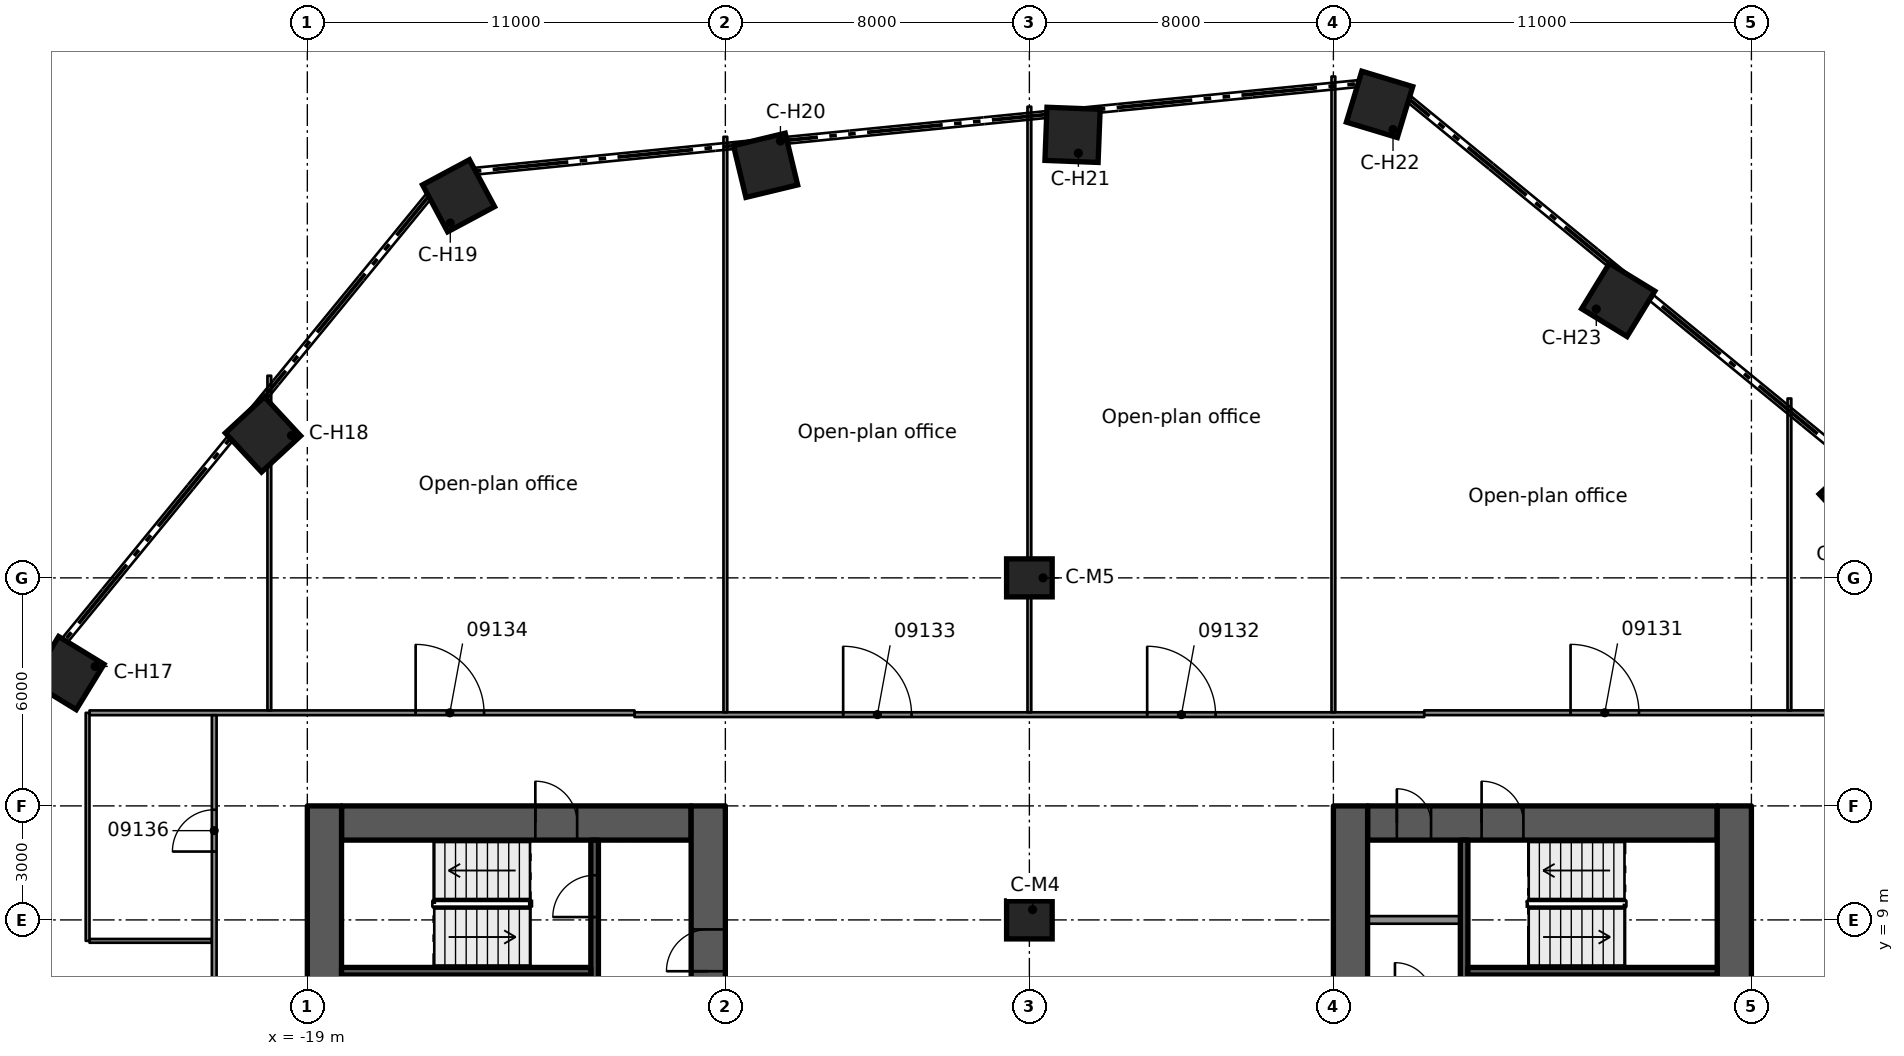
"""IFC4 building model, lengths in metres.
Left out: names, types, materials, properties, quantities, classifications, styles, units other than length and angle.
Written with IfcOpenShell. Run it as: python <this file> out.ifc"""

import sys

from ifc_helpers import new_model, si_unit, direction, frame, frame_2d, origin, origin_2d, place, context, subcontext, project, spatial, rectangle, extrude, element, fill, save


model = new_model("IFC4")
c1 = context("Model", 3, precision=1e-05, world=origin(), true_north=direction((0.0, 1.0)))
c2 = subcontext(c1, "Body", "Model", "MODEL_VIEW")
j1 = project(units=[si_unit("LENGTHUNIT", "METRE"), si_unit("PLANEANGLEUNIT", "RADIAN")], contexts=[c1])
p1 = place(None, origin())
s1 = spatial("IfcSite", under=j1, at=p1, CompositionType="ELEMENT")
p2 = place(p1, origin())
s2 = spatial("IfcBuilding", under=s1, at=p2, CompositionType="ELEMENT")
p3 = place(p2, frame((0.0, 0.0, 40.8)))
s3 = spatial("IfcBuildingStorey", under=s2, at=p3, CompositionType="ELEMENT", Elevation=40.8)
p4 = place(p3, frame((-18.1, 11.55, 0.0), z_axis=(0.0, 0.0, 1.0), x_axis=(1.0, 0.0, 0.0)))
e1 = element("IfcWall", 1, at=p4, inside=s3, PredefinedType="SHEAR", context=c2, shape_type="SweptSolid", body=[
    extrude(rectangle(XDim=9.2, YDim=0.9, at=frame_2d((4.6, 0.0))), origin(), (0.0, 0.0, 1.0), 3.5),
])
p5 = place(p4, frame((5.1, 0.0, 0.0)))
e2 = element("IfcOpeningElement", 2, at=p5, cuts=e1, PredefinedType="OPENING", context=c2, shape_type="SweptSolid", body=[
    extrude(rectangle(XDim=1.1, YDim=2.1, at=frame_2d((0.55, 1.05))), frame((0.0, 0.46, 0.0), z_axis=(0.0, -1.0, 0.0), x_axis=(1.0, 0.0, 0.0)), (0.0, 0.0, 1.0), 0.92),
])
p6 = place(p3, frame((-18.55, -12.0, 0.0), z_axis=(0.0, 0.0, 1.0), x_axis=(0.0, 1.0, 0.0)))
e3 = element("IfcWall", 3, at=p6, inside=s3, PredefinedType="SHEAR", context=c2, shape_type="SweptSolid", body=[
    extrude(rectangle(XDim=24.0, YDim=0.9, at=frame_2d((12.0, 0.0))), origin(), (0.0, 0.0, 1.0), 3.5),
])
p7 = place(p6, frame((10.1, 0.0, 0.0)))
e4 = element("IfcOpeningElement", 4, at=p7, cuts=e3, PredefinedType="OPENING", context=c2, shape_type="SweptSolid", body=[
    extrude(rectangle(XDim=1.8, YDim=2.1, at=frame_2d((0.9, 1.05))), frame((0.0, 0.46, 0.0), z_axis=(0.0, -1.0, 0.0), x_axis=(1.0, 0.0, 0.0)), (0.0, 0.0, 1.0), 0.92),
])
p8 = place(p3, frame((-8.45, -12.0, 0.0), z_axis=(0.0, 0.0, 1.0), x_axis=(0.0, 1.0, 0.0)))
e5 = element("IfcWall", 5, at=p8, inside=s3, PredefinedType="SHEAR", context=c2, shape_type="SweptSolid", body=[
    extrude(rectangle(XDim=24.0, YDim=0.9, at=frame_2d((12.0, 0.0))), origin(), (0.0, 0.0, 1.0), 3.5),
])
p9 = place(p8, frame((9.6, 0.0, 0.0)))
e6 = element("IfcOpeningElement", 6, at=p9, cuts=e5, PredefinedType="OPENING", context=c2, shape_type="SweptSolid", body=[
    extrude(rectangle(XDim=1.8, YDim=2.1, at=frame_2d((0.9, 1.05))), frame((0.0, 0.46, 0.0), z_axis=(0.0, -1.0, 0.0), x_axis=(1.0, 0.0, 0.0)), (0.0, 0.0, 1.0), 0.92),
])
p10 = place(p8, frame((19.65, 0.0, 0.0)))
e7 = element("IfcOpeningElement", 7, at=p10, cuts=e5, PredefinedType="OPENING", context=c2, shape_type="SweptSolid", body=[
    extrude(rectangle(XDim=1.1, YDim=2.1, at=frame_2d((0.55, 1.05))), frame((0.0, 0.46, 0.0), z_axis=(0.0, -1.0, 0.0), x_axis=(1.0, 0.0, 0.0)), (0.0, 0.0, 1.0), 0.92),
])
p11 = place(p3, frame((8.9, 11.55, 0.0), z_axis=(0.0, 0.0, 1.0), x_axis=(1.0, 0.0, 0.0)))
e8 = element("IfcWall", 8, at=p11, inside=s3, PredefinedType="SHEAR", context=c2, shape_type="SweptSolid", body=[
    extrude(rectangle(XDim=9.2, YDim=0.9, at=frame_2d((4.6, 0.0))), origin(), (0.0, 0.0, 1.0), 3.5),
])
p12 = place(p11, frame((3.0, 0.0, 0.0)))
e9 = element("IfcOpeningElement", 9, at=p12, cuts=e8, PredefinedType="OPENING", context=c2, shape_type="SweptSolid", body=[
    extrude(rectangle(XDim=1.1, YDim=2.1, at=frame_2d((0.55, 1.05))), frame((0.0, 0.46, 0.0), z_axis=(0.0, -1.0, 0.0), x_axis=(1.0, 0.0, 0.0)), (0.0, 0.0, 1.0), 0.92),
])
p13 = place(p11, frame((0.77, 0.0, 0.0)))
e10 = element("IfcOpeningElement", 10, at=p13, cuts=e8, PredefinedType="OPENING", context=c2, shape_type="SweptSolid", body=[
    extrude(rectangle(XDim=0.9, YDim=2.1, at=frame_2d((0.45, 1.05))), frame((0.0, 0.46, 0.0), z_axis=(0.0, -1.0, 0.0), x_axis=(1.0, 0.0, 0.0)), (0.0, 0.0, 1.0), 0.92),
])
p14 = place(p3, frame((8.45, -12.0, 0.0), z_axis=(0.0, 0.0, 1.0), x_axis=(0.0, 1.0, 0.0)))
e11 = element("IfcWall", 11, at=p14, inside=s3, PredefinedType="SHEAR", context=c2, shape_type="SweptSolid", body=[
    extrude(rectangle(XDim=24.0, YDim=0.9, at=frame_2d((12.0, 0.0))), origin(), (0.0, 0.0, 1.0), 3.5),
])
p15 = place(p14, frame((12.6, 0.0, 0.0)))
e12 = element("IfcOpeningElement", 12, at=p15, cuts=e11, PredefinedType="OPENING", context=c2, shape_type="SweptSolid", body=[
    extrude(rectangle(XDim=1.8, YDim=2.1, at=frame_2d((0.9, 1.05))), frame((0.0, 0.46, 0.0), z_axis=(0.0, -1.0, 0.0), x_axis=(1.0, 0.0, 0.0)), (0.0, 0.0, 1.0), 0.92),
])
p16 = place(p14, frame((3.25, 0.0, 0.0)))
e13 = element("IfcOpeningElement", 13, at=p16, cuts=e11, PredefinedType="OPENING", context=c2, shape_type="SweptSolid", body=[
    extrude(rectangle(XDim=1.1, YDim=2.1, at=frame_2d((0.55, 1.05))), frame((0.0, 0.46, 0.0), z_axis=(0.0, -1.0, 0.0), x_axis=(1.0, 0.0, 0.0)), (0.0, 0.0, 1.0), 0.92),
])
p17 = place(p3, frame((18.55, -12.0, 0.0), z_axis=(0.0, 0.0, 1.0), x_axis=(0.0, 1.0, 0.0)))
e14 = element("IfcWall", 14, at=p17, inside=s3, PredefinedType="SHEAR", context=c2, shape_type="SweptSolid", body=[
    extrude(rectangle(XDim=24.0, YDim=0.9, at=frame_2d((12.0, 0.0))), origin(), (0.0, 0.0, 1.0), 3.5),
])
p18 = place(p17, frame((12.1, 0.0, 0.0)))
e15 = element("IfcOpeningElement", 15, at=p18, cuts=e14, PredefinedType="OPENING", context=c2, shape_type="SweptSolid", body=[
    extrude(rectangle(XDim=1.8, YDim=2.1, at=frame_2d((0.9, 1.05))), frame((0.0, 0.46, 0.0), z_axis=(0.0, -1.0, 0.0), x_axis=(1.0, 0.0, 0.0)), (0.0, 0.0, 1.0), 0.92),
])
for number, where, z_axis, x_axis in (
    (16, (-25.313, 15.495, 0.0), (0.0, 0.0, 1.0), (-0.853, 0.522, 0.0)),
    (17, (-20.167, 21.774, 0.0), (0.0, 0.0, 1.0), (-0.68, 0.734, 0.0)),
    (18, (-15.021, 28.054, 0.0), (0.0, 0.0, 1.0), (-0.472, 0.882, 0.0)),
    (19, (-6.942, 28.856, 0.0), (0.0, 0.0, 1.0), (-0.234, 0.972, 0.0)),
    (20, (1.136, 29.657, 0.0), (0.0, 0.0, 1.0), (0.038, 0.999, 0.0)),
    (21, (9.215, 30.459, 0.0), (0.0, 0.0, 1.0), (0.29, 0.957, 0.0)),
    (22, (15.495, 25.313, 0.0), (0.0, 0.0, 1.0), (0.522, 0.853, 0.0)),
    (23, (21.774, 20.167, 0.0), (0.0, 0.0, 1.0), (0.734, 0.68, 0.0)),
):
    element("IfcColumn", number, at=place(p3, frame(where, z_axis=z_axis, x_axis=x_axis)), inside=s3, PredefinedType="COLUMN", context=c2, shape_type="SweptSolid", body=[
        extrude(rectangle(XDim=1.4, YDim=1.4, at=origin_2d()), origin(), (0.0, 0.0, 1.0), 3.5),
    ])
for number, where, z_axis, x_axis in (
    (24, (0.0, 9.0, 0.0), (0.0, 0.0, 1.0), (1.0, 0.0, 0.0)),
    (25, (0.0, 18.0, 0.0), (0.0, 0.0, 1.0), (1.0, 0.0, 0.0)),
):
    element("IfcColumn", number, at=place(p3, frame(where, z_axis=z_axis, x_axis=x_axis)), inside=s3, PredefinedType="COLUMN", context=c2, shape_type="SweptSolid", body=[
        extrude(rectangle(XDim=1.2, YDim=1.0, at=origin_2d()), origin(), (0.0, 0.0, 1.0), 3.5),
    ])
p19 = place(p3, frame((-11.44, 6.975, 0.0), z_axis=(0.0, 0.0, 1.0), x_axis=(0.0, 1.0, 0.0)))
e26 = element("IfcWall", 26, at=p19, inside=s3, PredefinedType="SOLIDWALL", context=c2, shape_type="SweptSolid", body=[
    extrude(rectangle(XDim=4.125, YDim=0.2, at=frame_2d((2.062, 0.0))), origin(), (0.0, 0.0, 1.0), 3.08),
])
p20 = place(p19, frame((2.1, 0.0, 0.0)))
e27 = element("IfcOpeningElement", 27, at=p20, cuts=e26, PredefinedType="OPENING", context=c2, shape_type="SweptSolid", body=[
    extrude(rectangle(XDim=1.1, YDim=2.1, at=frame_2d((0.55, 1.05))), frame((0.0, 0.11, 0.0), z_axis=(0.0, -1.0, 0.0), x_axis=(1.0, 0.0, 0.0)), (0.0, 0.0, 1.0), 0.22),
])
p21 = place(p3, frame((-11.54, 7.65, 0.0), z_axis=(0.0, 0.0, 1.0), x_axis=(-1.0, 0.0, 0.0)))
e28 = element("IfcWall", 28, at=p21, inside=s3, PredefinedType="SOLIDWALL", context=c2, shape_type="SweptSolid", body=[
    extrude(rectangle(XDim=6.56, YDim=0.2, at=frame_2d((3.28, 0.0))), origin(), (0.0, 0.0, 1.0), 3.08),
])
p22 = place(p3, frame((11.44, 11.1, 0.0), z_axis=(0.0, 0.0, 1.0), x_axis=(0.0, -1.0, 0.0)))
e29 = element("IfcWall", 29, at=p22, inside=s3, PredefinedType="SOLIDWALL", context=c2, shape_type="SweptSolid", body=[
    extrude(rectangle(XDim=4.125, YDim=0.2, at=frame_2d((2.062, 0.0))), origin(), (0.0, 0.0, 1.0), 3.08),
])
p23 = place(p3, frame((11.54, 7.65, 0.0), z_axis=(0.0, 0.0, 1.0), x_axis=(1.0, 0.0, 0.0)))
e30 = element("IfcWall", 30, at=p23, inside=s3, PredefinedType="SOLIDWALL", context=c2, shape_type="SweptSolid", body=[
    extrude(rectangle(XDim=6.56, YDim=0.2, at=frame_2d((3.28, 0.0))), origin(), (0.0, 0.0, 1.0), 3.08),
])
p24 = place(p3, frame((8.9, 9.0, 0.0), z_axis=(0.0, 0.0, 1.0), x_axis=(1.0, 0.0, 0.0)))
e31 = element("IfcWall", 31, at=p24, inside=s3, PredefinedType="PARTITIONING", context=c2, shape_type="SweptSolid", body=[
    extrude(rectangle(XDim=2.44, YDim=0.2, at=frame_2d((1.22, 0.0))), origin(), (0.0, 0.0, 1.0), 3.08),
])
p25 = place(p3, frame((-24.732, 8.449, 0.0), z_axis=(0.0, 0.0, 1.0), x_axis=(1.0, 0.0, 0.0)))
e32 = element("IfcWall", 32, at=p25, inside=s3, PredefinedType="PARTITIONING", context=c2, shape_type="SweptSolid", body=[
    extrude(rectangle(XDim=3.22, YDim=0.1, at=frame_2d((1.61, 0.0))), origin(), (0.0, 0.0, 1.0), 3.06),
])
p26 = place(p3, frame((-10.39, 14.401, 0.0), z_axis=(0.0, 0.0, 1.0), x_axis=(1.0, 0.0, 0.0)))
e33 = element("IfcWall", 33, at=p26, inside=s3, PredefinedType="PARTITIONING", context=c2, shape_type="SweptSolid", body=[
    extrude(rectangle(XDim=20.781, YDim=0.125, at=frame_2d((10.391, 0.0))), origin(), (0.0, 0.0, 1.0), 3.06),
])
p27 = place(p26, frame((13.49, 0.0, 0.0)))
e34 = element("IfcOpeningElement", 34, at=p27, cuts=e33, PredefinedType="OPENING", context=c2, shape_type="SweptSolid", body=[
    extrude(rectangle(XDim=1.8, YDim=2.1, at=frame_2d((0.9, 1.05))), frame((0.0, 0.073, 0.0), z_axis=(0.0, -1.0, 0.0), x_axis=(1.0, 0.0, 0.0)), (0.0, 0.0, 1.0), 0.145),
])
p28 = place(p26, frame((5.49, 0.0, 0.0)))
e35 = element("IfcOpeningElement", 35, at=p28, cuts=e33, PredefinedType="OPENING", context=c2, shape_type="SweptSolid", body=[
    extrude(rectangle(XDim=1.8, YDim=2.1, at=frame_2d((0.9, 1.05))), frame((0.0, 0.073, 0.0), z_axis=(0.0, -1.0, 0.0), x_axis=(1.0, 0.0, 0.0)), (0.0, 0.0, 1.0), 0.145),
])
p29 = place(p3, frame((-24.731, 14.45, 0.0), z_axis=(0.0, 0.0, 1.0), x_axis=(1.0, 0.0, 0.0)))
e36 = element("IfcWall", 36, at=p29, inside=s3, PredefinedType="PARTITIONING", context=c2, shape_type="SweptSolid", body=[
    extrude(rectangle(XDim=14.34, YDim=0.125, at=frame_2d((7.17, 0.0))), origin(), (0.0, 0.0, 1.0), 3.06),
])
p30 = place(p29, frame((8.581, 0.0, 0.0)))
e37 = element("IfcOpeningElement", 37, at=p30, cuts=e36, PredefinedType="OPENING", context=c2, shape_type="SweptSolid", body=[
    extrude(rectangle(XDim=1.8, YDim=2.1, at=frame_2d((0.9, 1.05))), frame((0.0, 0.073, 0.0), z_axis=(0.0, -1.0, 0.0), x_axis=(1.0, 0.0, 0.0)), (0.0, 0.0, 1.0), 0.145),
])
p31 = place(p3, frame((10.391, 14.451, 0.0), z_axis=(0.0, 0.0, 1.0), x_axis=(1.0, 0.0, 0.0)))
e38 = element("IfcWall", 38, at=p31, inside=s3, PredefinedType="PARTITIONING", context=c2, shape_type="SweptSolid", body=[
    extrude(rectangle(XDim=10.996, YDim=0.125, at=frame_2d((5.498, 0.0))), origin(), (0.0, 0.0, 1.0), 3.06),
])
p32 = place(p31, frame((3.85, 0.0, 0.0)))
e39 = element("IfcOpeningElement", 39, at=p32, cuts=e38, PredefinedType="OPENING", context=c2, shape_type="SweptSolid", body=[
    extrude(rectangle(XDim=1.8, YDim=2.1, at=frame_2d((0.9, 1.05))), frame((0.0, 0.073, 0.0), z_axis=(0.0, -1.0, 0.0), x_axis=(1.0, 0.0, 0.0)), (0.0, 0.0, 1.0), 0.145),
])
p33 = place(p3, frame((20.0, 14.514, 0.0), z_axis=(0.0, 0.0, 1.0), x_axis=(0.0, 1.0, 0.0)))
e40 = element("IfcWall", 40, at=p33, inside=s3, PredefinedType="PARTITIONING", context=c2, shape_type="SweptSolid", body=[
    extrude(rectangle(XDim=8.206, YDim=0.1, at=frame_2d((4.103, 0.0))), origin(), (0.0, 0.0, 1.0), 3.06),
])
p34 = place(p3, frame((8.0, 14.463, 0.0), z_axis=(0.0, 0.0, 1.0), x_axis=(0.0, 1.0, 0.0)))
e41 = element("IfcWall", 41, at=p34, inside=s3, PredefinedType="PARTITIONING", context=c2, shape_type="SweptSolid", body=[
    extrude(rectangle(XDim=16.729, YDim=0.1, at=frame_2d((8.365, 0.0))), origin(), (0.0, 0.0, 1.0), 3.06),
])
p35 = place(p3, frame((0.0, 14.463, 0.0), z_axis=(0.0, 0.0, 1.0), x_axis=(0.0, 1.0, 0.0)))
e42 = element("IfcWall", 42, at=p35, inside=s3, PredefinedType="PARTITIONING", context=c2, shape_type="SweptSolid", body=[
    extrude(rectangle(XDim=15.935, YDim=0.1, at=frame_2d((7.968, 0.0))), origin(), (0.0, 0.0, 1.0), 3.06),
])
p36 = place(p3, frame((-8.0, 14.463, 0.0), z_axis=(0.0, 0.0, 1.0), x_axis=(0.0, 1.0, 0.0)))
e43 = element("IfcWall", 43, at=p36, inside=s3, PredefinedType="PARTITIONING", context=c2, shape_type="SweptSolid", body=[
    extrude(rectangle(XDim=15.142, YDim=0.1, at=frame_2d((7.571, 0.0))), origin(), (0.0, 0.0, 1.0), 3.06),
])
p37 = place(p3, frame((-20.0, 14.514, 0.0), z_axis=(0.0, 0.0, 1.0), x_axis=(0.0, 1.0, 0.0)))
e44 = element("IfcWall", 44, at=p37, inside=s3, PredefinedType="PARTITIONING", context=c2, shape_type="SweptSolid", body=[
    extrude(rectangle(XDim=8.805, YDim=0.1, at=frame_2d((4.403, 0.0))), origin(), (0.0, 0.0, 1.0), 3.06),
])
p38 = place(p3, frame((-21.45, -13.175, 0.0), z_axis=(0.0, 0.0, 1.0), x_axis=(0.0, 1.0, 0.0)))
e45 = element("IfcWall", 45, at=p38, inside=s3, PredefinedType="PARTITIONING", context=c2, shape_type="SweptSolid", body=[
    extrude(rectangle(XDim=27.561, YDim=0.125, at=frame_2d((13.781, 0.0))), origin(), (0.0, 0.0, 1.0), 3.06),
])
p39 = place(p38, frame((6.35, 0.0, 0.0)))
e46 = element("IfcOpeningElement", 46, at=p39, cuts=e45, PredefinedType="OPENING", context=c2, shape_type="SweptSolid", body=[
    extrude(rectangle(XDim=0.9, YDim=2.1, at=frame_2d((0.45, 1.05))), frame((0.0, 0.073, 0.0), z_axis=(0.0, -1.0, 0.0), x_axis=(1.0, 0.0, 0.0)), (0.0, 0.0, 1.0), 0.145),
])
p40 = place(p38, frame((16.911, 0.0, 0.0)))
e47 = element("IfcOpeningElement", 47, at=p40, cuts=e45, PredefinedType="OPENING", context=c2, shape_type="SweptSolid", body=[
    extrude(rectangle(XDim=1.8, YDim=2.1, at=frame_2d((0.9, 1.05))), frame((0.0, 0.073, 0.0), z_axis=(0.0, -1.0, 0.0), x_axis=(1.0, 0.0, 0.0)), (0.0, 0.0, 1.0), 0.145),
])
p41 = place(p38, frame((23.974, 0.0, 0.0)))
e48 = element("IfcOpeningElement", 48, at=p41, cuts=e45, PredefinedType="OPENING", context=c2, shape_type="SweptSolid", body=[
    extrude(rectangle(XDim=1.1, YDim=2.1, at=frame_2d((0.55, 1.05))), frame((0.0, 0.073, 0.0), z_axis=(0.0, -1.0, 0.0), x_axis=(1.0, 0.0, 0.0)), (0.0, 0.0, 1.0), 0.145),
])
p42 = place(p3, frame((-24.782, 8.449, 0.0), z_axis=(0.0, 0.0, 1.0), x_axis=(0.0, 1.0, 0.0)))
e49 = element("IfcWall", 49, at=p42, inside=s3, PredefinedType="PARTITIONING", context=c2, shape_type="SweptSolid", body=[
    extrude(rectangle(XDim=6.0, YDim=0.1, at=frame_2d((3.0, 0.0))), origin(), (0.0, 0.0, 1.0), 3.06),
])
p43 = place(p10, origin())
e50 = element("IfcDoor", 50, at=p43, inside=s3, OperationType="SINGLE_SWING_RIGHT", PredefinedType="DOOR", context=c2, shape_type="SweptSolid", body=[
    extrude(rectangle(XDim=1.1, YDim=2.1, at=frame_2d((0.55, 1.05))), frame((0.0, 0.025, 0.0), z_axis=(0.0, -1.0, 0.0), x_axis=(1.0, 0.0, 0.0)), (0.0, 0.0, 1.0), 0.05),
])
fill(e7, e50)
p44 = place(p5, origin())
e51 = element("IfcDoor", 51, at=p44, inside=s3, OperationType="SINGLE_SWING_RIGHT", PredefinedType="DOOR", context=c2, shape_type="SweptSolid", body=[
    extrude(rectangle(XDim=1.1, YDim=2.1, at=frame_2d((0.55, 1.05))), frame((0.0, 0.025, 0.0), z_axis=(0.0, -1.0, 0.0), x_axis=(1.0, 0.0, 0.0)), (0.0, 0.0, 1.0), 0.05),
])
fill(e2, e51)
p45 = place(p20, origin())
e52 = element("IfcDoor", 52, at=p45, inside=s3, OperationType="SINGLE_SWING_RIGHT", PredefinedType="DOOR", context=c2, shape_type="SweptSolid", body=[
    extrude(rectangle(XDim=1.1, YDim=2.1, at=frame_2d((0.55, 1.05))), frame((0.0, 0.025, 0.0), z_axis=(0.0, -1.0, 0.0), x_axis=(1.0, 0.0, 0.0)), (0.0, 0.0, 1.0), 0.05),
])
fill(e27, e52)
p46 = place(p12, origin())
e53 = element("IfcDoor", 53, at=p46, inside=s3, OperationType="SINGLE_SWING_LEFT", PredefinedType="DOOR", context=c2, shape_type="SweptSolid", body=[
    extrude(rectangle(XDim=1.1, YDim=2.1, at=frame_2d((0.55, 1.05))), frame((0.0, 0.025, 0.0), z_axis=(0.0, -1.0, 0.0), x_axis=(1.0, 0.0, 0.0)), (0.0, 0.0, 1.0), 0.05),
])
fill(e9, e53)
p47 = place(p13, origin())
e54 = element("IfcDoor", 54, at=p47, inside=s3, OperationType="SINGLE_SWING_LEFT", PredefinedType="DOOR", context=c2, shape_type="SweptSolid", body=[
    extrude(rectangle(XDim=0.9, YDim=2.1, at=frame_2d((0.45, 1.05))), frame((0.0, 0.025, 0.0), z_axis=(0.0, -1.0, 0.0), x_axis=(1.0, 0.0, 0.0)), (0.0, 0.0, 1.0), 0.05),
])
fill(e10, e54)
p48 = place(p32, origin())
e55 = element("IfcDoor", 55, at=p48, inside=s3, OperationType="DOUBLE_DOOR_SINGLE_SWING", PredefinedType="DOOR", context=c2, shape_type="SweptSolid", body=[
    extrude(rectangle(XDim=1.8, YDim=2.1, at=frame_2d((0.9, 1.05))), frame((0.0, 0.025, 0.0), z_axis=(0.0, -1.0, 0.0), x_axis=(1.0, 0.0, 0.0)), (0.0, 0.0, 1.0), 0.05),
])
fill(e39, e55)
p49 = place(p27, origin())
e56 = element("IfcDoor", 56, at=p49, inside=s3, OperationType="DOUBLE_DOOR_SINGLE_SWING", PredefinedType="DOOR", context=c2, shape_type="SweptSolid", body=[
    extrude(rectangle(XDim=1.8, YDim=2.1, at=frame_2d((0.9, 1.05))), frame((0.0, 0.025, 0.0), z_axis=(0.0, -1.0, 0.0), x_axis=(1.0, 0.0, 0.0)), (0.0, 0.0, 1.0), 0.05),
])
fill(e34, e56)
p50 = place(p28, origin())
e57 = element("IfcDoor", 57, at=p50, inside=s3, OperationType="DOUBLE_DOOR_SINGLE_SWING", PredefinedType="DOOR", context=c2, shape_type="SweptSolid", body=[
    extrude(rectangle(XDim=1.8, YDim=2.1, at=frame_2d((0.9, 1.05))), frame((0.0, 0.025, 0.0), z_axis=(0.0, -1.0, 0.0), x_axis=(1.0, 0.0, 0.0)), (0.0, 0.0, 1.0), 0.05),
])
fill(e35, e57)
p51 = place(p30, origin())
e58 = element("IfcDoor", 58, at=p51, inside=s3, OperationType="DOUBLE_DOOR_SINGLE_SWING", PredefinedType="DOOR", context=c2, shape_type="SweptSolid", body=[
    extrude(rectangle(XDim=1.8, YDim=2.1, at=frame_2d((0.9, 1.05))), frame((0.0, 0.025, 0.0), z_axis=(0.0, -1.0, 0.0), x_axis=(1.0, 0.0, 0.0)), (0.0, 0.0, 1.0), 0.05),
])
fill(e37, e58)
p52 = place(p41, origin())
e59 = element("IfcDoor", 59, at=p52, inside=s3, OperationType="SINGLE_SWING_RIGHT", PredefinedType="DOOR", context=c2, shape_type="SweptSolid", body=[
    extrude(rectangle(XDim=1.1, YDim=2.1, at=frame_2d((0.55, 1.05))), frame((0.0, 0.025, 0.0), z_axis=(0.0, -1.0, 0.0), x_axis=(1.0, 0.0, 0.0)), (0.0, 0.0, 1.0), 0.05),
])
fill(e48, e59)
save(model, sys.argv[1])
